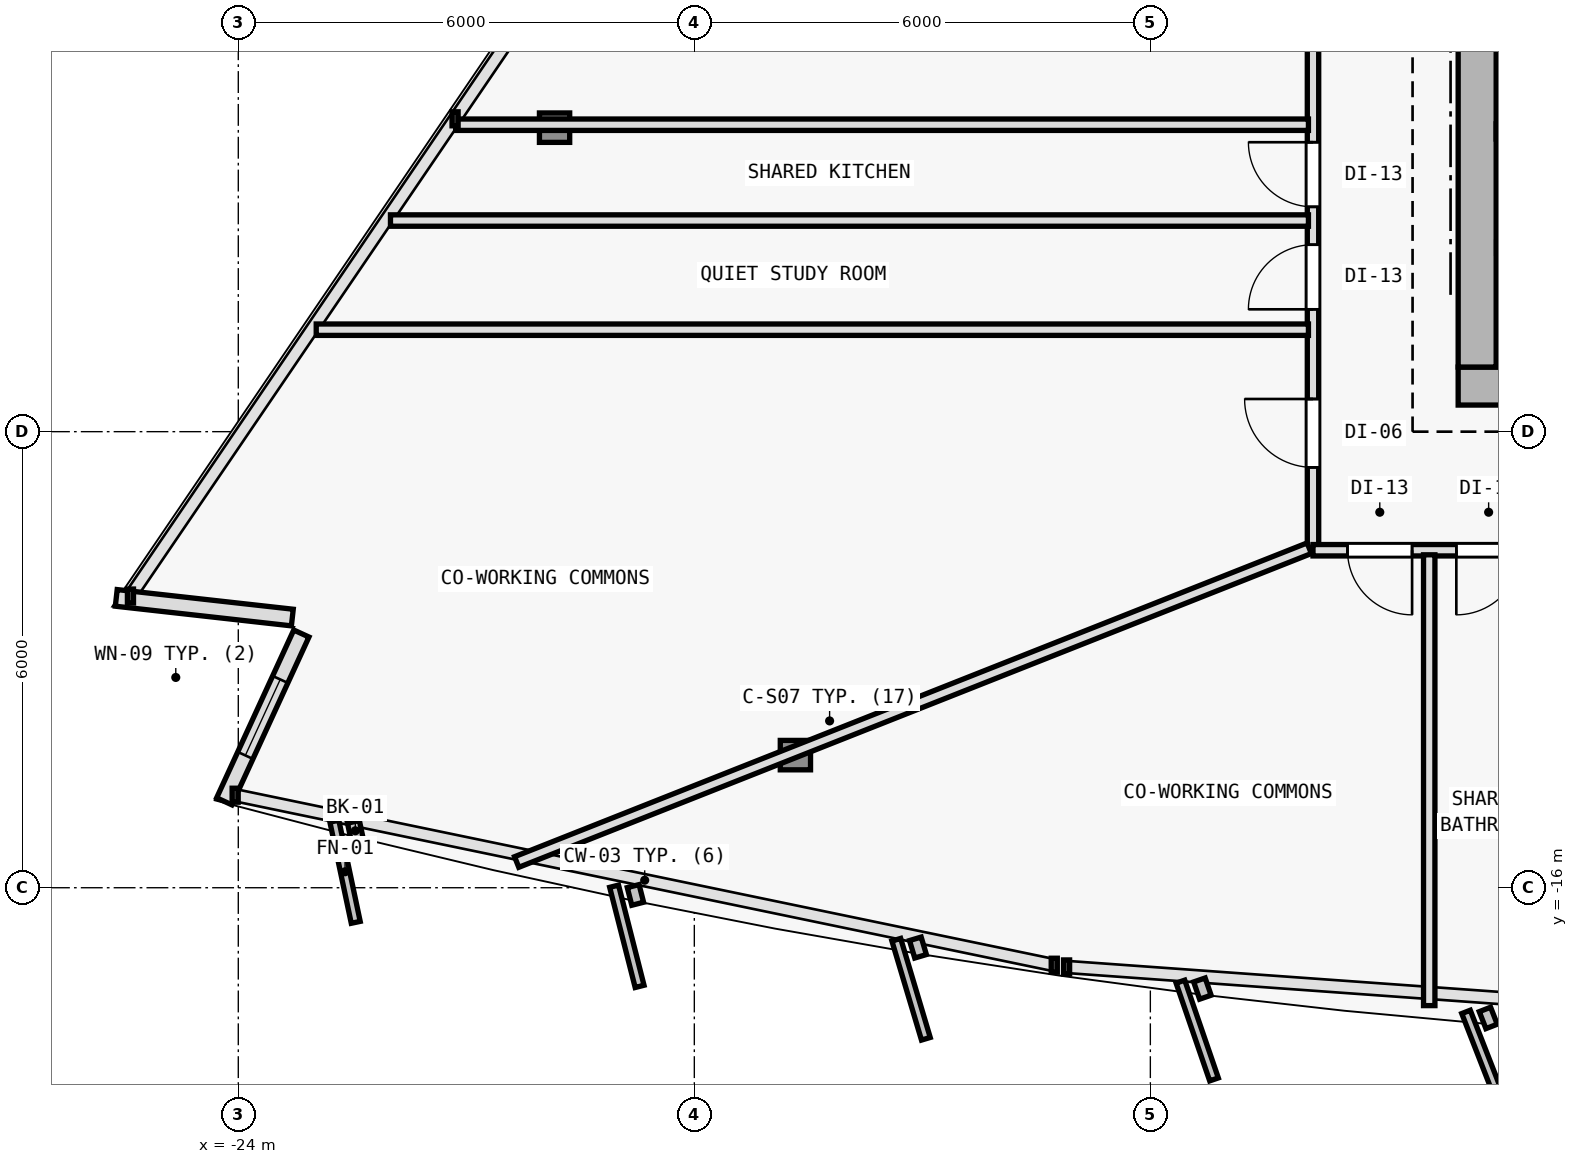
"""IFC4 building model, lengths in metres.
Left out: names, types, materials, properties, quantities, classifications, styles, units other than length and angle.
Written with IfcOpenShell. Run it as: python <this file> out.ifc"""

import sys

from ifc_helpers import new_model, si_unit, direction, frame, frame_2d, origin, origin_2d, place, context, subcontext, project, spatial, rectangle, i_section, extrude, element, fill, save


model = new_model("IFC4")
c1 = context("Model", 3, precision=1e-05, world=origin(), true_north=direction((0.0, 1.0)))
c2 = subcontext(c1, "Body", "Model", "MODEL_VIEW")
j1 = project(units=[si_unit("LENGTHUNIT", "METRE"), si_unit("PLANEANGLEUNIT", "RADIAN")], contexts=[c1])
p1 = place(None, origin())
s1 = spatial("IfcSite", under=j1, at=p1, CompositionType="ELEMENT")
p2 = place(p1, origin())
s2 = spatial("IfcBuilding", under=s1, at=p2, CompositionType="ELEMENT")
p3 = place(p2, frame((0.0, 0.0, 212.7)))
s3 = spatial("IfcBuildingStorey", under=s2, at=p3, CompositionType="ELEMENT", Elevation=212.7)
p4 = place(p3, frame((-7.7, -9.4, 0.0), z_axis=(0.0, 0.0, 1.0), x_axis=(1.0, 0.0, 0.0)))
e1 = element("IfcColumn", 1, at=p4, inside=s3, PredefinedType="COLUMN", context=c2, shape_type="SweptSolid", body=[
    extrude(i_section(OverallWidth=0.398, OverallDepth=0.387, WebThickness=0.013, FlangeThickness=0.022, FilletRadius=0.015, at=origin_2d()), origin(), (0.0, 0.0, 1.0), 3.6),
])
p5 = place(p3, frame((-16.67, -14.255, 0.006), z_axis=(0.020596292833, 0.033511459955, 0.999226087917), x_axis=(-0.851954850327, 0.523615252838, 0.0)))
e2 = element("IfcColumn", 2, at=p5, inside=s3, PredefinedType="COLUMN", context=c2, shape_type="SweptSolid", body=[
    extrude(i_section(OverallWidth=0.398, OverallDepth=0.387, WebThickness=0.013, FlangeThickness=0.022, FilletRadius=0.015, at=origin_2d()), origin(), (0.0, 0.0, 1.0), 3.592),
])
p6 = place(p3, frame((-19.839, -6.0, 0.006), z_axis=(0.025224200599, 0.021552753612, 0.99944945771), x_axis=(-0.649609258817, 0.760268249278, 0.0)))
e3 = element("IfcColumn", 3, at=p6, inside=s3, PredefinedType="COLUMN", context=c2, shape_type="SweptSolid", body=[
    extrude(i_section(OverallWidth=0.398, OverallDepth=0.387, WebThickness=0.013, FlangeThickness=0.022, FilletRadius=0.015, at=origin_2d()), origin(), (0.0, 0.0, 1.0), 3.591),
])
p7 = place(p3, frame((-23.289, -12.446, 0.0), z_axis=(0.0, 0.0, 1.0), x_axis=(-0.993829972675, 0.110914315635, 0.0)))
e4 = element("IfcWall", 4, at=p7, inside=s3, PredefinedType="SOLIDWALL", context=c2, shape_type="SweptSolid", body=[
    extrude(rectangle(XDim=2.331, YDim=0.22, at=frame_2d((1.166, 0.0))), origin(), (0.0, 0.0, 1.0), 3.35),
])
p8 = place(p3, frame((-24.185, -14.863, 0.0), z_axis=(0.0, 0.0, 1.0), x_axis=(0.417509141111, 0.90867272276, 0.0)))
e5 = element("IfcWall", 5, at=p8, inside=s3, PredefinedType="SOLIDWALL", context=c2, shape_type="SweptSolid", body=[
    extrude(rectangle(XDim=2.43, YDim=0.22, at=frame_2d((1.215, 0.0))), origin(), (0.0, 0.0, 1.0), 3.35),
])
p9 = place(p8, frame((0.665, 0.0, 0.62)))
e6 = element("IfcOpeningElement", 6, at=p9, cuts=e5, PredefinedType="OPENING", context=c2, shape_type="SweptSolid", body=[
    extrude(rectangle(XDim=1.1, YDim=1.8, at=frame_2d((0.55, 0.9))), frame((0.0, 0.12, 0.0), z_axis=(0.0, -1.0, 0.0), x_axis=(1.0, 0.0, 0.0)), (0.0, 0.0, 1.0), 0.24),
])
p10 = place(p3, frame((-7.95, -9.4, 0.0), z_axis=(0.0, 0.0, 1.0), x_axis=(1.0, 0.0, 0.0)))
e7 = element("IfcWall", 7, at=p10, inside=s3, PredefinedType="SHEAR", context=c2, shape_type="SweptSolid", body=[
    extrude(rectangle(XDim=15.9, YDim=0.5, at=frame_2d((7.95, 0.0))), origin(), (0.0, 0.0, 1.0), 3.35),
])
p11 = place(p10, frame((9.6, 0.0, 0.0)))
e8 = element("IfcOpeningElement", 8, at=p11, cuts=e7, PredefinedType="OPENING", context=c2, shape_type="SweptSolid", body=[
    extrude(rectangle(XDim=1.5, YDim=2.2, at=frame_2d((0.75, 1.1))), frame((0.0, 0.26, 0.0), z_axis=(0.0, -1.0, 0.0), x_axis=(1.0, 0.0, 0.0)), (0.0, 0.0, 1.0), 0.52),
])
p12 = place(p3, frame((-7.7, -9.15, 0.0), z_axis=(0.0, 0.0, 1.0), x_axis=(0.0, 1.0, 0.0)))
e9 = element("IfcWall", 9, at=p12, inside=s3, PredefinedType="SHEAR", context=c2, shape_type="SweptSolid", body=[
    extrude(rectangle(XDim=19.1, YDim=0.5, at=frame_2d((9.55, 0.0))), origin(), (0.0, 0.0, 1.0), 3.35),
])
p13 = place(p12, frame((12.7, 0.0, 0.0)))
e10 = element("IfcOpeningElement", 10, at=p13, cuts=e9, PredefinedType="OPENING", context=c2, shape_type="SweptSolid", body=[
    extrude(rectangle(XDim=1.1, YDim=2.15, at=frame_2d((0.55, 1.075))), frame((0.0, 0.26, 0.0), z_axis=(0.0, -1.0, 0.0), x_axis=(1.0, 0.0, 0.0)), (0.0, 0.0, 1.0), 0.52),
])
p14 = place(p3, frame((-7.45, -6.05, 0.0), z_axis=(0.0, 0.0, 1.0), x_axis=(1.0, 0.0, 0.0)))
e11 = element("IfcWall", 11, at=p14, inside=s3, PredefinedType="SOLIDWALL", context=c2, shape_type="SweptSolid", body=[
    extrude(rectangle(XDim=3.4, YDim=0.2, at=frame_2d((1.7, 0.0))), origin(), (0.0, 0.0, 1.0), 3.35),
])
p15 = place(p3, frame((-7.445, -7.58, 0.0), z_axis=(0.0, 0.0, 1.0), x_axis=(1.0, 0.0, 0.0)))
e12 = element("IfcWall", 12, at=p15, inside=s3, PredefinedType="PARTITIONING", context=c2, shape_type="SweptSolid", body=[
    extrude(rectangle(XDim=6.195, YDim=0.15, at=frame_2d((3.098, 0.0))), origin(), (0.0, 0.0, 1.0), 3.35),
])
p16 = place(p3, frame((-9.86, -11.56, 0.0), z_axis=(0.0, 0.0, 1.0), x_axis=(0.0, 1.0, 0.0)))
e13 = element("IfcWall", 13, at=p16, inside=s3, PredefinedType="PARTITIONING", context=c2, shape_type="SweptSolid", body=[
    extrude(rectangle(XDim=19.986, YDim=0.15, at=frame_2d((9.993, 0.0))), origin(), (0.0, 0.0, 1.0), 2.825),
])
p17 = place(p16, frame((4.518, 0.0, 0.0)))
e14 = element("IfcOpeningElement", 14, at=p17, cuts=e13, PredefinedType="OPENING", context=c2, shape_type="SweptSolid", body=[
    extrude(rectangle(XDim=0.85, YDim=2.1, at=frame_2d((0.425, 1.05))), frame((0.0, 0.085, 0.0), z_axis=(0.0, -1.0, 0.0), x_axis=(1.0, 0.0, 0.0)), (0.0, 0.0, 1.0), 0.17),
])
p18 = place(p16, frame((3.17, 0.0, 0.0)))
e15 = element("IfcOpeningElement", 15, at=p18, cuts=e13, PredefinedType="OPENING", context=c2, shape_type="SweptSolid", body=[
    extrude(rectangle(XDim=0.85, YDim=2.1, at=frame_2d((0.425, 1.05))), frame((0.0, 0.085, 0.0), z_axis=(0.0, -1.0, 0.0), x_axis=(1.0, 0.0, 0.0)), (0.0, 0.0, 1.0), 0.17),
])
p19 = place(p16, frame((1.09, 0.0, 0.0)))
e16 = element("IfcOpeningElement", 16, at=p19, cuts=e13, PredefinedType="OPENING", context=c2, shape_type="SweptSolid", body=[
    extrude(rectangle(XDim=0.9, YDim=2.1, at=frame_2d((0.45, 1.05))), frame((0.0, 0.085, 0.0), z_axis=(0.0, -1.0, 0.0), x_axis=(1.0, 0.0, 0.0)), (0.0, 0.0, 1.0), 0.17),
])
p20 = place(p16, frame((12.253, 0.0, 0.0)))
e17 = element("IfcOpeningElement", 17, at=p20, cuts=e13, PredefinedType="OPENING", context=c2, shape_type="SweptSolid", body=[
    extrude(rectangle(XDim=0.9, YDim=2.1, at=frame_2d((0.45, 1.05))), frame((0.0, 0.085, 0.0), z_axis=(0.0, -1.0, 0.0), x_axis=(1.0, 0.0, 0.0)), (0.0, 0.0, 1.0), 0.17),
])
p21 = place(p3, frame((13.18, -11.56, 0.0), z_axis=(0.0, 0.0, 1.0), x_axis=(-1.0, 0.0, 0.0)))
e18 = element("IfcWall", 18, at=p21, inside=s3, PredefinedType="PARTITIONING", context=c2, shape_type="SweptSolid", body=[
    extrude(rectangle(XDim=23.04, YDim=0.15, at=frame_2d((11.52, 0.0))), origin(), (0.0, 0.0, 1.0), 2.825),
])
p22 = place(p21, frame((21.736, 0.0, 0.0)))
e19 = element("IfcOpeningElement", 19, at=p22, cuts=e18, PredefinedType="OPENING", context=c2, shape_type="SweptSolid", body=[
    extrude(rectangle(XDim=0.85, YDim=2.1, at=frame_2d((0.425, 1.05))), frame((0.0, 0.085, 0.0), z_axis=(0.0, -1.0, 0.0), x_axis=(1.0, 0.0, 0.0)), (0.0, 0.0, 1.0), 0.17),
])
p23 = place(p21, frame((20.304, 0.0, 0.0)))
e20 = element("IfcOpeningElement", 20, at=p23, cuts=e18, PredefinedType="OPENING", context=c2, shape_type="SweptSolid", body=[
    extrude(rectangle(XDim=0.85, YDim=2.1, at=frame_2d((0.425, 1.05))), frame((0.0, 0.085, 0.0), z_axis=(0.0, -1.0, 0.0), x_axis=(1.0, 0.0, 0.0)), (0.0, 0.0, 1.0), 0.17),
])
p24 = place(p21, frame((18.926, 0.0, 0.0)))
e21 = element("IfcOpeningElement", 21, at=p24, cuts=e18, PredefinedType="OPENING", context=c2, shape_type="SweptSolid", body=[
    extrude(rectangle(XDim=0.85, YDim=2.1, at=frame_2d((0.425, 1.05))), frame((0.0, 0.085, 0.0), z_axis=(0.0, -1.0, 0.0), x_axis=(1.0, 0.0, 0.0)), (0.0, 0.0, 1.0), 0.17),
])
p25 = place(p21, frame((17.057, 0.0, 0.0)))
e22 = element("IfcOpeningElement", 22, at=p25, cuts=e18, PredefinedType="OPENING", context=c2, shape_type="SweptSolid", body=[
    extrude(rectangle(XDim=0.9, YDim=2.1, at=frame_2d((0.45, 1.05))), frame((0.0, 0.085, 0.0), z_axis=(0.0, -1.0, 0.0), x_axis=(1.0, 0.0, 0.0)), (0.0, 0.0, 1.0), 0.17),
])
p26 = place(p21, frame((14.367, 0.0, 0.0)))
e23 = element("IfcOpeningElement", 23, at=p26, cuts=e18, PredefinedType="OPENING", context=c2, shape_type="SweptSolid", body=[
    extrude(rectangle(XDim=0.9, YDim=2.1, at=frame_2d((0.45, 1.05))), frame((0.0, 0.085, 0.0), z_axis=(0.0, -1.0, 0.0), x_axis=(1.0, 0.0, 0.0)), (0.0, 0.0, 1.0), 0.17),
])
p27 = place(p21, frame((11.09, 0.0, 0.0)))
e24 = element("IfcOpeningElement", 24, at=p27, cuts=e18, PredefinedType="OPENING", context=c2, shape_type="SweptSolid", body=[
    extrude(rectangle(XDim=0.9, YDim=2.1, at=frame_2d((0.45, 1.05))), frame((0.0, 0.085, 0.0), z_axis=(0.0, -1.0, 0.0), x_axis=(1.0, 0.0, 0.0)), (0.0, 0.0, 1.0), 0.17),
])
p28 = place(p21, frame((8.205, 0.0, 0.0)))
e25 = element("IfcOpeningElement", 25, at=p28, cuts=e18, PredefinedType="OPENING", context=c2, shape_type="SweptSolid", body=[
    extrude(rectangle(XDim=0.9, YDim=2.1, at=frame_2d((0.45, 1.05))), frame((0.0, 0.085, 0.0), z_axis=(0.0, -1.0, 0.0), x_axis=(1.0, 0.0, 0.0)), (0.0, 0.0, 1.0), 0.17),
])
p29 = place(p21, frame((3.442, 0.0, 0.0)))
e26 = element("IfcOpeningElement", 26, at=p29, cuts=e18, PredefinedType="OPENING", context=c2, shape_type="SweptSolid", body=[
    extrude(rectangle(XDim=0.9, YDim=2.1, at=frame_2d((0.45, 1.05))), frame((0.0, 0.085, 0.0), z_axis=(0.0, -1.0, 0.0), x_axis=(1.0, 0.0, 0.0)), (0.0, 0.0, 1.0), 0.17),
])
p30 = place(p3, frame((-9.909, -11.533, 0.0), z_axis=(0.0, 0.0, 1.0), x_axis=(-0.929796369929, -0.368074327367, 0.0)))
e27 = element("IfcWall", 27, at=p30, inside=s3, PredefinedType="PARTITIONING", context=c2, shape_type="SweptSolid", body=[
    extrude(rectangle(XDim=11.216, YDim=0.15, at=frame_2d((5.608, 0.0))), origin(), (0.0, 0.0, 1.0), 2.875),
])
p31 = place(p3, frame((-9.92, -5.962, 0.0), z_axis=(0.0, 0.0, 1.0), x_axis=(-1.0, 0.0, 0.0)))
e28 = element("IfcWall", 28, at=p31, inside=s3, PredefinedType="PARTITIONING", context=c2, shape_type="SweptSolid", body=[
    extrude(rectangle(XDim=11.22, YDim=0.15, at=frame_2d((5.61, 0.0))), origin(), (0.0, 0.0, 1.0), 2.825),
])
p32 = place(p3, frame((-9.92, -8.658, 0.0), z_axis=(0.0, 0.0, 1.0), x_axis=(-1.0, 0.0, 0.0)))
e29 = element("IfcWall", 29, at=p32, inside=s3, PredefinedType="PARTITIONING", context=c2, shape_type="SweptSolid", body=[
    extrude(rectangle(XDim=13.055, YDim=0.15, at=frame_2d((6.527, 0.0))), origin(), (0.0, 0.0, 1.0), 2.825),
])
p33 = place(p3, frame((-8.331, -11.62, 0.0), z_axis=(0.0, 0.0, 1.0), x_axis=(0.0, -1.0, 0.0)))
e30 = element("IfcWall", 30, at=p33, inside=s3, PredefinedType="PARTITIONING", context=c2, shape_type="SweptSolid", body=[
    extrude(rectangle(XDim=5.931, YDim=0.15, at=frame_2d((2.965, 0.0))), origin(), (0.0, 0.0, 1.0), 2.875),
])
p34 = place(p3, frame((-9.92, -7.222, 0.0), z_axis=(0.0, 0.0, 1.0), x_axis=(-1.0, 0.0, 0.0)))
e31 = element("IfcWall", 31, at=p34, inside=s3, PredefinedType="PARTITIONING", context=c2, shape_type="SweptSolid", body=[
    extrude(rectangle(XDim=12.078, YDim=0.15, at=frame_2d((6.039, 0.0))), origin(), (0.0, 0.0, 1.0), 2.825),
])
p35 = place(p9, origin())
e32 = element("IfcWindow", 32, at=p35, inside=s3, PartitioningType="SINGLE_PANEL", PredefinedType="WINDOW", context=c2, shape_type="SweptSolid", body=[
    extrude(rectangle(XDim=1.1, YDim=1.8, at=frame_2d((0.55, 0.9))), frame((0.0, 0.03, 0.0), z_axis=(0.0, -1.0, 0.0), x_axis=(1.0, 0.0, 0.0)), (0.0, 0.0, 1.0), 0.06),
])
fill(e6, e32)
p36 = place(p17, origin())
e33 = element("IfcDoor", 33, at=p36, inside=s3, OperationType="SINGLE_SWING_RIGHT", PredefinedType="DOOR", context=c2, shape_type="SweptSolid", body=[
    extrude(rectangle(XDim=0.85, YDim=2.1, at=frame_2d((0.425, 1.05))), frame((0.0, 0.025, 0.0), z_axis=(0.0, -1.0, 0.0), x_axis=(1.0, 0.0, 0.0)), (0.0, 0.0, 1.0), 0.05),
])
fill(e14, e33)
p37 = place(p18, origin())
e34 = element("IfcDoor", 34, at=p37, inside=s3, OperationType="SINGLE_SWING_LEFT", PredefinedType="DOOR", context=c2, shape_type="SweptSolid", body=[
    extrude(rectangle(XDim=0.85, YDim=2.1, at=frame_2d((0.425, 1.05))), frame((0.0, 0.025, 0.0), z_axis=(0.0, -1.0, 0.0), x_axis=(1.0, 0.0, 0.0)), (0.0, 0.0, 1.0), 0.05),
])
fill(e15, e34)
p38 = place(p19, origin())
e35 = element("IfcDoor", 35, at=p38, inside=s3, OperationType="SINGLE_SWING_RIGHT", PredefinedType="DOOR", context=c2, shape_type="SweptSolid", body=[
    extrude(rectangle(XDim=0.9, YDim=2.1, at=frame_2d((0.45, 1.05))), frame((0.0, 0.025, 0.0), z_axis=(0.0, -1.0, 0.0), x_axis=(1.0, 0.0, 0.0)), (0.0, 0.0, 1.0), 0.05),
])
fill(e16, e35)
p39 = place(p22, origin())
e36 = element("IfcDoor", 36, at=p39, inside=s3, OperationType="SINGLE_SWING_LEFT", PredefinedType="DOOR", context=c2, shape_type="SweptSolid", body=[
    extrude(rectangle(XDim=0.85, YDim=2.1, at=frame_2d((0.425, 1.05))), frame((0.0, 0.025, 0.0), z_axis=(0.0, -1.0, 0.0), x_axis=(1.0, 0.0, 0.0)), (0.0, 0.0, 1.0), 0.05),
])
fill(e19, e36)
p40 = place(p23, origin())
e37 = element("IfcDoor", 37, at=p40, inside=s3, OperationType="SINGLE_SWING_RIGHT", PredefinedType="DOOR", context=c2, shape_type="SweptSolid", body=[
    extrude(rectangle(XDim=0.85, YDim=2.1, at=frame_2d((0.425, 1.05))), frame((0.0, 0.025, 0.0), z_axis=(0.0, -1.0, 0.0), x_axis=(1.0, 0.0, 0.0)), (0.0, 0.0, 1.0), 0.05),
])
fill(e20, e37)
save(model, sys.argv[1])
